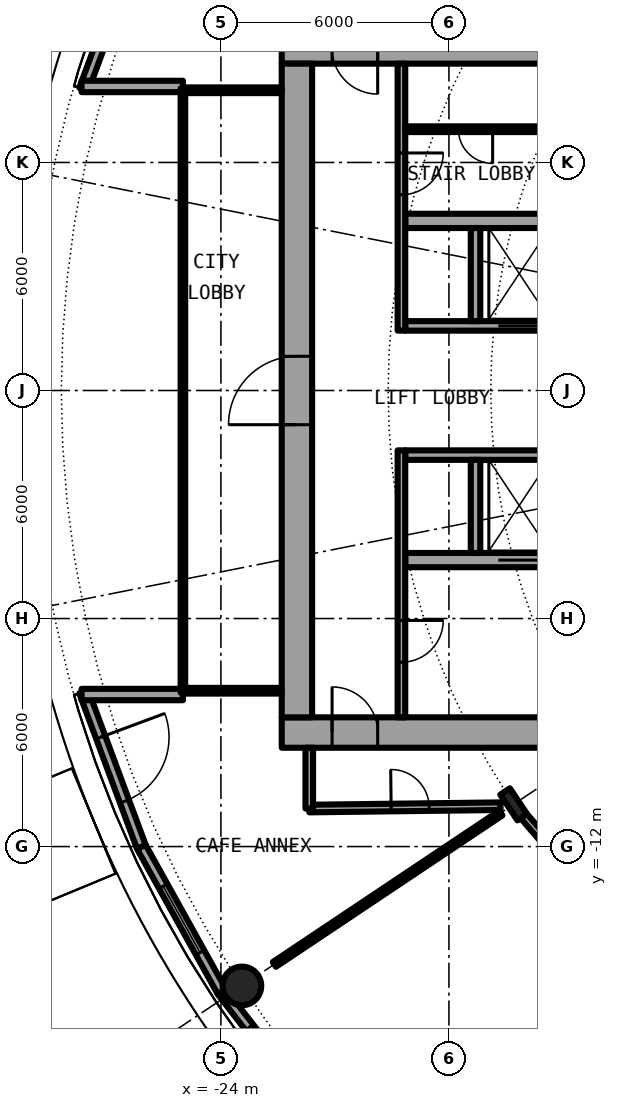
"""IFC4 building model, lengths in metres.
Left out: names, types, materials, properties, quantities, classifications, styles, units other than length and angle.
Written with IfcOpenShell. Run it as: python <this file> out.ifc"""

import sys

from ifc_helpers import new_model, si_unit, direction, frame, frame_2d, origin, origin_2d, place, context, subcontext, project, spatial, rectangle, hollow_circle, i_section, extrude, element, fill, save


model = new_model("IFC4")
c1 = context("Model", 3, precision=1e-05, world=origin(), true_north=direction((0.0, 1.0)))
c2 = subcontext(c1, "Body", "Model", "MODEL_VIEW")
j1 = project(units=[si_unit("LENGTHUNIT", "METRE"), si_unit("PLANEANGLEUNIT", "RADIAN")], contexts=[c1])
p1 = place(None, origin())
s1 = spatial("IfcSite", under=j1, at=p1, CompositionType="ELEMENT")
p2 = place(p1, origin())
s2 = spatial("IfcBuilding", under=s1, at=p2, CompositionType="ELEMENT")
p3 = place(p2, frame((0.0, 0.0, 9.6)))
s3 = spatial("IfcBuildingStorey", under=s2, at=p3, CompositionType="ELEMENT", Elevation=9.6)
p4 = place(p3, frame((-23.448, -15.667, 0.0), z_axis=(0.0, 0.0, 1.0), x_axis=(1.0, 0.0, 0.0)))
e1 = element("IfcColumn", 1, at=p4, inside=s3, PredefinedType="COLUMN", context=c2, shape_type="SweptSolid", body=[
    extrude(hollow_circle(Radius=0.508, WallThickness=0.05, at=origin_2d()), origin(), (0.0, 0.0, 1.0), 4.5),
])
p5 = place(p3, frame((-16.297, -10.889, 0.0), z_axis=(0.0, 0.0, 1.0), x_axis=(-0.831469612303, -0.55557023302, 0.0)))
e2 = element("IfcColumn", 2, at=p5, inside=s3, PredefinedType="COLUMN", context=c2, shape_type="SweptSolid", body=[
    extrude(i_section(OverallWidth=0.303, OverallDepth=0.814, WebThickness=0.021, FlangeThickness=0.04, FilletRadius=0.03, at=origin_2d()), origin(), (0.0, 0.0, 1.0), 4.5),
])
p6 = place(p3, frame((-26.093, 12.011, 0.0), z_axis=(0.0, 0.0, 1.0), x_axis=(-0.348003729264, -0.937493148998, 0.0)))
e3 = element("IfcWall", 3, at=p6, inside=s3, PredefinedType="SOLIDWALL", context=c2, shape_type="SweptSolid", body=[
    extrude(rectangle(XDim=4.359, YDim=0.25, at=frame_2d((2.18, 0.0))), origin(), (0.0, 0.0, 1.0), 4.05),
])
p7 = place(p6, frame((1.18, 0.0, 0.9)))
e4 = element("IfcOpeningElement", 4, at=p7, cuts=e3, PredefinedType="OPENING", context=c2, shape_type="SweptSolid", body=[
    extrude(rectangle(XDim=2.0, YDim=2.4, at=frame_2d((1.0, 1.2))), frame((0.0, 0.135, 0.0), z_axis=(0.0, -1.0, 0.0), x_axis=(1.0, 0.0, 0.0)), (0.0, 0.0, 1.0), 0.27),
])
p8 = place(p3, frame((-27.61, -7.924, 0.0), z_axis=(0.0, 0.0, 1.0), x_axis=(0.348003729264, -0.937493148998, 0.0)))
e5 = element("IfcWall", 5, at=p8, inside=s3, PredefinedType="SOLIDWALL", context=c2, shape_type="SweptSolid", body=[
    extrude(rectangle(XDim=4.359, YDim=0.25, at=frame_2d((2.18, 0.0))), origin(), (0.0, 0.0, 1.0), 4.05),
])
p9 = place(p8, frame((1.28, 0.0, 0.0)))
e6 = element("IfcOpeningElement", 6, at=p9, cuts=e5, PredefinedType="OPENING", context=c2, shape_type="SweptSolid", body=[
    extrude(rectangle(XDim=1.8, YDim=2.2, at=frame_2d((0.9, 1.1))), frame((0.0, 0.135, 0.0), z_axis=(0.0, -1.0, 0.0), x_axis=(1.0, 0.0, 0.0)), (0.0, 0.0, 1.0), 0.27),
])
p10 = place(p3, frame((-26.093, -12.011, 0.0), z_axis=(0.0, 0.0, 1.0), x_axis=(0.485761785263, -0.8740912355, 0.0)))
e7 = element("IfcWall", 7, at=p10, inside=s3, PredefinedType="SOLIDWALL", context=c2, shape_type="SweptSolid", body=[
    extrude(rectangle(XDim=4.36, YDim=0.25, at=frame_2d((2.18, 0.0))), origin(), (0.0, 0.0, 1.0), 4.05),
])
p11 = place(p10, frame((1.18, 0.0, 0.9)))
e8 = element("IfcOpeningElement", 8, at=p11, cuts=e7, PredefinedType="OPENING", context=c2, shape_type="SweptSolid", body=[
    extrude(rectangle(XDim=2.0, YDim=2.4, at=frame_2d((1.0, 1.2))), frame((0.0, 0.135, 0.0), z_axis=(0.0, -1.0, 0.0), x_axis=(1.0, 0.0, 0.0)), (0.0, 0.0, 1.0), 0.27),
])
p12 = place(p3, frame((-23.975, -15.822, 0.0), z_axis=(0.0, 0.0, 1.0), x_axis=(0.612637256412, -0.790364214812, 0.0)))
e9 = element("IfcWall", 9, at=p12, inside=s3, PredefinedType="SOLIDWALL", context=c2, shape_type="SweptSolid", body=[
    extrude(rectangle(XDim=4.36, YDim=0.25, at=frame_2d((2.18, 0.0))), origin(), (0.0, 0.0, 1.0), 4.05),
])
p13 = place(p12, frame((1.18, 0.0, 0.9)))
e10 = element("IfcOpeningElement", 10, at=p13, cuts=e9, PredefinedType="OPENING", context=c2, shape_type="SweptSolid", body=[
    extrude(rectangle(XDim=2.0, YDim=2.4, at=frame_2d((1.0, 1.2))), frame((0.0, 0.135, 0.0), z_axis=(0.0, -1.0, 0.0), x_axis=(1.0, 0.0, 0.0)), (0.0, 0.0, 1.0), 0.27),
])
for number, where, z_axis, x_axis in (
    (11, (-25.0, 8.0, 0.0), (0.0, 0.0, 1.0), (-1.0, 0.0, 0.0)),
    (12, (-25.0, -8.0, 0.0), (0.0, 0.0, 1.0), (-1.0, 0.0, 0.0)),
):
    element("IfcWall", number, at=place(p3, frame(where, z_axis=z_axis, x_axis=x_axis)), inside=s3, PredefinedType="SOLIDWALL", context=c2, shape_type="SweptSolid", body=[
        extrude(rectangle(XDim=2.667, YDim=0.3, at=frame_2d((1.333, 0.0))), origin(), (0.0, 0.0, 1.0), 4.05),
    ])
p14 = place(p3, frame((-22.4, -9.0, 0.0), z_axis=(0.0, 0.0, 1.0), x_axis=(1.0, 0.0, 0.0)))
e13 = element("IfcWall", 13, at=p14, inside=s3, PredefinedType="SHEAR", context=c2, shape_type="SweptSolid", body=[
    extrude(rectangle(XDim=14.2, YDim=0.8, at=frame_2d((7.1, 0.0))), origin(), (0.0, 0.0, 1.0), 4.5),
])
p15 = place(p14, frame((1.325, 0.0, 0.0)))
e14 = element("IfcOpeningElement", 14, at=p15, cuts=e13, PredefinedType="OPENING", context=c2, shape_type="SweptSolid", body=[
    extrude(rectangle(XDim=1.2, YDim=2.3, at=frame_2d((0.6, 1.15))), frame((0.0, 0.41, 0.0), z_axis=(0.0, -1.0, 0.0), x_axis=(1.0, 0.0, 0.0)), (0.0, 0.0, 1.0), 0.82),
])
p16 = place(p3, frame((-8.2, 9.0, 0.0), z_axis=(0.0, 0.0, 1.0), x_axis=(-1.0, 0.0, 0.0)))
e15 = element("IfcWall", 15, at=p16, inside=s3, PredefinedType="SHEAR", context=c2, shape_type="SweptSolid", body=[
    extrude(rectangle(XDim=14.2, YDim=0.8, at=frame_2d((7.1, 0.0))), origin(), (0.0, 0.0, 1.0), 4.5),
])
p17 = place(p16, frame((11.675, 0.0, 0.0)))
e16 = element("IfcOpeningElement", 16, at=p17, cuts=e15, PredefinedType="OPENING", context=c2, shape_type="SweptSolid", body=[
    extrude(rectangle(XDim=1.2, YDim=2.3, at=frame_2d((0.6, 1.15))), frame((0.0, 0.41, 0.0), z_axis=(0.0, -1.0, 0.0), x_axis=(1.0, 0.0, 0.0)), (0.0, 0.0, 1.0), 0.82),
])
p18 = place(p3, frame((-22.0, -8.6, 0.0), z_axis=(0.0, 0.0, 1.0), x_axis=(0.0, 1.0, 0.0)))
e17 = element("IfcWall", 17, at=p18, inside=s3, PredefinedType="SHEAR", context=c2, shape_type="SweptSolid", body=[
    extrude(rectangle(XDim=17.2, YDim=0.8, at=frame_2d((8.6, 0.0))), origin(), (0.0, 0.0, 1.0), 4.5),
])
p19 = place(p18, frame((7.7, 0.0, 0.0)))
e18 = element("IfcOpeningElement", 18, at=p19, cuts=e17, PredefinedType="OPENING", context=c2, shape_type="SweptSolid", body=[
    extrude(rectangle(XDim=1.8, YDim=2.3, at=frame_2d((0.9, 1.15))), frame((0.0, 0.41, 0.0), z_axis=(0.0, -1.0, 0.0), x_axis=(1.0, 0.0, 0.0)), (0.0, 0.0, 1.0), 0.82),
])
p20 = place(p3, frame((-9.0, -1.7, 0.0), z_axis=(0.0, 0.0, 1.0), x_axis=(-1.0, 0.0, 0.0)))
e19 = element("IfcWall", 19, at=p20, inside=s3, PredefinedType="SHEAR", context=c2, shape_type="SweptSolid", body=[
    extrude(rectangle(XDim=10.15, YDim=0.25, at=frame_2d((5.075, 0.0))), origin(), (0.0, 0.0, 1.0), 4.5),
])
p21 = place(p20, frame((0.387, 0.0, 0.0)))
e20 = element("IfcOpeningElement", 20, at=p21, cuts=e19, PredefinedType="OPENING", context=c2, shape_type="SweptSolid", body=[
    extrude(rectangle(XDim=1.1, YDim=2.3, at=frame_2d((0.55, 1.15))), frame((0.0, 0.135, 0.0), z_axis=(0.0, -1.0, 0.0), x_axis=(1.0, 0.0, 0.0)), (0.0, 0.0, 1.0), 0.27),
])
p22 = place(p20, frame((2.45, 0.0, 0.0)))
e21 = element("IfcOpeningElement", 21, at=p22, cuts=e19, PredefinedType="OPENING", context=c2, shape_type="SweptSolid", body=[
    extrude(rectangle(XDim=1.1, YDim=2.3, at=frame_2d((0.55, 1.15))), frame((0.0, 0.135, 0.0), z_axis=(0.0, -1.0, 0.0), x_axis=(1.0, 0.0, 0.0)), (0.0, 0.0, 1.0), 0.27),
])
p23 = place(p20, frame((4.45, 0.0, 0.0)))
e22 = element("IfcOpeningElement", 22, at=p23, cuts=e19, PredefinedType="OPENING", context=c2, shape_type="SweptSolid", body=[
    extrude(rectangle(XDim=1.1, YDim=2.3, at=frame_2d((0.55, 1.15))), frame((0.0, 0.135, 0.0), z_axis=(0.0, -1.0, 0.0), x_axis=(1.0, 0.0, 0.0)), (0.0, 0.0, 1.0), 0.27),
])
p24 = place(p3, frame((-9.0, -4.462, 0.0), z_axis=(0.0, 0.0, 1.0), x_axis=(-1.0, 0.0, 0.0)))
e23 = element("IfcWall", 23, at=p24, inside=s3, PredefinedType="SHEAR", context=c2, shape_type="SweptSolid", body=[
    extrude(rectangle(XDim=10.15, YDim=0.375, at=frame_2d((5.075, 0.0))), origin(), (0.0, 0.0, 1.0), 4.5),
])
p25 = place(p24, frame((6.6, 0.0, 0.0)))
e24 = element("IfcOpeningElement", 24, at=p25, cuts=e23, PredefinedType="OPENING", context=c2, shape_type="SweptSolid", body=[
    extrude(rectangle(XDim=1.1, YDim=2.3, at=frame_2d((0.55, 1.15))), frame((0.0, 0.198, 0.0), z_axis=(0.0, -1.0, 0.0), x_axis=(1.0, 0.0, 0.0)), (0.0, 0.0, 1.0), 0.395),
])
p26 = place(p3, frame((-17.3, -1.825, 0.0), z_axis=(0.0, 0.0, 1.0), x_axis=(0.0, -1.0, 0.0)))
e25 = element("IfcWall", 25, at=p26, inside=s3, PredefinedType="SOLIDWALL", context=c2, shape_type="SweptSolid", body=[
    extrude(rectangle(XDim=2.45, YDim=0.25, at=frame_2d((1.225, 0.0))), origin(), (0.0, 0.0, 1.0), 4.05),
])
p27 = place(p3, frame((-19.25, -1.575, 0.0), z_axis=(0.0, 0.0, 1.0), x_axis=(0.0, -1.0, 0.0)))
e26 = element("IfcWall", 26, at=p27, inside=s3, PredefinedType="SOLIDWALL", context=c2, shape_type="SweptSolid", body=[
    extrude(rectangle(XDim=7.025, YDim=0.2, at=frame_2d((3.513, 0.0))), origin(), (0.0, 0.0, 1.0), 4.05),
])
p28 = place(p27, frame((4.475, 0.0, 0.0)))
e27 = element("IfcOpeningElement", 27, at=p28, cuts=e26, PredefinedType="OPENING", context=c2, shape_type="SweptSolid", body=[
    extrude(rectangle(XDim=1.1, YDim=2.3, at=frame_2d((0.55, 1.15))), frame((0.0, 0.11, 0.0), z_axis=(0.0, -1.0, 0.0), x_axis=(1.0, 0.0, 0.0)), (0.0, 0.0, 1.0), 0.22),
])
p29 = place(p3, frame((-19.15, 1.7, 0.0), z_axis=(0.0, 0.0, 1.0), x_axis=(1.0, 0.0, 0.0)))
e28 = element("IfcWall", 28, at=p29, inside=s3, PredefinedType="SHEAR", context=c2, shape_type="SweptSolid", body=[
    extrude(rectangle(XDim=10.15, YDim=0.25, at=frame_2d((5.075, 0.0))), origin(), (0.0, 0.0, 1.0), 4.5),
])
p30 = place(p29, frame((2.45, 0.0, 0.0)))
e29 = element("IfcOpeningElement", 29, at=p30, cuts=e28, PredefinedType="OPENING", context=c2, shape_type="SweptSolid", body=[
    extrude(rectangle(XDim=1.1, YDim=2.3, at=frame_2d((0.55, 1.15))), frame((0.0, 0.135, 0.0), z_axis=(0.0, -1.0, 0.0), x_axis=(1.0, 0.0, 0.0)), (0.0, 0.0, 1.0), 0.27),
])
p31 = place(p29, frame((8.837, 0.0, 0.0)))
e30 = element("IfcOpeningElement", 30, at=p31, cuts=e28, PredefinedType="OPENING", context=c2, shape_type="SweptSolid", body=[
    extrude(rectangle(XDim=0.9, YDim=2.3, at=frame_2d((0.45, 1.15))), frame((0.0, 0.135, 0.0), z_axis=(0.0, -1.0, 0.0), x_axis=(1.0, 0.0, 0.0)), (0.0, 0.0, 1.0), 0.27),
])
p32 = place(p29, frame((6.8, 0.0, 0.0)))
e31 = element("IfcOpeningElement", 31, at=p32, cuts=e28, PredefinedType="OPENING", context=c2, shape_type="SweptSolid", body=[
    extrude(rectangle(XDim=0.9, YDim=2.3, at=frame_2d((0.45, 1.15))), frame((0.0, 0.135, 0.0), z_axis=(0.0, -1.0, 0.0), x_axis=(1.0, 0.0, 0.0)), (0.0, 0.0, 1.0), 0.27),
])
p33 = place(p29, frame((4.725, 0.0, 0.0)))
e32 = element("IfcOpeningElement", 32, at=p33, cuts=e28, PredefinedType="OPENING", context=c2, shape_type="SweptSolid", body=[
    extrude(rectangle(XDim=0.9, YDim=2.3, at=frame_2d((0.45, 1.15))), frame((0.0, 0.135, 0.0), z_axis=(0.0, -1.0, 0.0), x_axis=(1.0, 0.0, 0.0)), (0.0, 0.0, 1.0), 0.27),
])
p34 = place(p3, frame((-9.0, 4.462, 0.0), z_axis=(0.0, 0.0, 1.0), x_axis=(-1.0, 0.0, 0.0)))
e33 = element("IfcWall", 33, at=p34, inside=s3, PredefinedType="SHEAR", context=c2, shape_type="SweptSolid", body=[
    extrude(rectangle(XDim=10.15, YDim=0.375, at=frame_2d((5.075, 0.0))), origin(), (0.0, 0.0, 1.0), 4.5),
])
p35 = place(p3, frame((-17.3, 1.825, 0.0), z_axis=(0.0, 0.0, 1.0), x_axis=(0.0, 1.0, 0.0)))
e34 = element("IfcWall", 34, at=p35, inside=s3, PredefinedType="SOLIDWALL", context=c2, shape_type="SweptSolid", body=[
    extrude(rectangle(XDim=2.45, YDim=0.25, at=frame_2d((1.225, 0.0))), origin(), (0.0, 0.0, 1.0), 4.05),
])
p36 = place(p3, frame((-19.25, 8.6, 0.0), z_axis=(0.0, 0.0, 1.0), x_axis=(0.0, -1.0, 0.0)))
e35 = element("IfcWall", 35, at=p36, inside=s3, PredefinedType="SOLIDWALL", context=c2, shape_type="SweptSolid", body=[
    extrude(rectangle(XDim=7.025, YDim=0.2, at=frame_2d((3.513, 0.0))), origin(), (0.0, 0.0, 1.0), 4.05),
])
p37 = place(p36, frame((2.35, 0.0, 0.0)))
e36 = element("IfcOpeningElement", 36, at=p37, cuts=e35, PredefinedType="OPENING", context=c2, shape_type="SweptSolid", body=[
    extrude(rectangle(XDim=1.1, YDim=2.3, at=frame_2d((0.55, 1.15))), frame((0.0, 0.11, 0.0), z_axis=(0.0, -1.0, 0.0), x_axis=(1.0, 0.0, 0.0)), (0.0, 0.0, 1.0), 0.22),
])
p38 = place(p3, frame((-15.45, 6.875, 0.0), z_axis=(0.0, 0.0, 1.0), x_axis=(-1.0, 0.0, 0.0)))
e37 = element("IfcWall", 37, at=p38, inside=s3, PredefinedType="PARTITIONING", context=c2, shape_type="SweptSolid", body=[
    extrude(rectangle(XDim=3.7, YDim=0.15, at=frame_2d((1.85, 0.0))), origin(), (0.0, 0.0, 1.0), 4.05),
])
p39 = place(p38, frame((1.4, 0.0, 0.0)))
e38 = element("IfcOpeningElement", 38, at=p39, cuts=e37, PredefinedType="OPENING", context=c2, shape_type="SweptSolid", body=[
    extrude(rectangle(XDim=0.9, YDim=2.3, at=frame_2d((0.45, 1.15))), frame((0.0, 0.085, 0.0), z_axis=(0.0, -1.0, 0.0), x_axis=(1.0, 0.0, 0.0)), (0.0, 0.0, 1.0), 0.17),
])
for number, where, z_axis, x_axis in (
    (39, (-22.4, 7.9, 0.0), (0.0, 0.0, 1.0), (-1.0, 0.0, 0.0)),
    (40, (-22.4, -7.9, 0.0), (0.0, 0.0, 1.0), (-1.0, 0.0, 0.0)),
):
    element("IfcWall", number, at=place(p3, frame(where, z_axis=z_axis, x_axis=x_axis)), inside=s3, PredefinedType="PARTITIONING", context=c2, shape_type="SweptSolid", body=[
        extrude(rectangle(XDim=2.54, YDim=0.15, at=frame_2d((1.27, 0.0))), origin(), (0.0, 0.0, 1.0), 4.05),
    ])
p40 = place(p3, frame((-25.0, 7.95, 0.0), z_axis=(0.0, 0.0, 1.0), x_axis=(0.0, -1.0, 0.0)))
e41 = element("IfcWall", 41, at=p40, inside=s3, PredefinedType="PARTITIONING", context=c2, shape_type="SweptSolid", body=[
    extrude(rectangle(XDim=15.9, YDim=0.12, at=frame_2d((7.95, 0.0))), origin(), (0.0, 0.0, 1.0), 4.05),
])
p41 = place(p40, frame((0.95, 0.0, 0.1)))
e42 = element("IfcOpeningElement", 42, at=p41, cuts=e41, PredefinedType="OPENING", context=c2, shape_type="SweptSolid", body=[
    extrude(rectangle(XDim=14.0, YDim=3.7, at=frame_2d((7.0, 1.85))), frame((0.0, 0.07, 0.0), z_axis=(0.0, -1.0, 0.0), x_axis=(1.0, 0.0, 0.0)), (0.0, 0.0, 1.0), 0.14),
])
p42 = place(p3, frame((-16.197, -11.005, 0.0), z_axis=(0.0, 0.0, 1.0), x_axis=(0.653077876854, -0.757290754443, 0.0)))
e43 = element("IfcWall", 43, at=p42, inside=s3, PredefinedType="PARTITIONING", context=c2, shape_type="SweptSolid", body=[
    extrude(rectangle(XDim=4.646, YDim=0.2, at=frame_2d((2.323, 0.0))), origin(), (0.0, 0.0, 1.0), 3.63),
])
p43 = place(p3, frame((-21.675, -11.0, 0.0), z_axis=(0.0, 0.0, 1.0), x_axis=(0.999924074118, 0.012322580895, 0.0)))
e44 = element("IfcWall", 44, at=p43, inside=s3, PredefinedType="PARTITIONING", context=c2, shape_type="SweptSolid", body=[
    extrude(rectangle(XDim=5.032, YDim=0.2, at=frame_2d((2.516, 0.0))), origin(), (0.0, 0.0, 1.0), 4.05),
])
p44 = place(p43, frame((2.155, 0.0, 0.0)))
e45 = element("IfcOpeningElement", 45, at=p44, cuts=e44, PredefinedType="OPENING", context=c2, shape_type="SweptSolid", body=[
    extrude(rectangle(XDim=1.0, YDim=2.3, at=frame_2d((0.5, 1.15))), frame((0.0, 0.11, 0.0), z_axis=(0.0, -1.0, 0.0), x_axis=(1.0, 0.0, 0.0)), (0.0, 0.0, 1.0), 0.22),
])
p45 = place(p3, frame((-22.593, -15.101, 0.0), z_axis=(0.0, 0.0, 1.0), x_axis=(0.831415754305, 0.555650828752, 0.0)))
e46 = element("IfcWall", 46, at=p45, inside=s3, PredefinedType="PARTITIONING", context=c2, shape_type="SweptSolid", body=[
    extrude(rectangle(XDim=7.168, YDim=0.15, at=frame_2d((3.584, 0.0))), origin(), (0.0, 0.0, 1.0), 4.05),
])
p46 = place(p3, frame((-21.675, -11.0, 0.0), z_axis=(0.0, 0.0, 1.0), x_axis=(0.0, 1.0, 0.0)))
e47 = element("IfcWall", 47, at=p46, inside=s3, PredefinedType="PARTITIONING", context=c2, shape_type="SweptSolid", body=[
    extrude(rectangle(XDim=1.6, YDim=0.2, at=frame_2d((0.8, 0.0))), origin(), (0.0, 0.0, 1.0), 4.05),
])
p47 = place(p9, origin())
e48 = element("IfcDoor", 48, at=p47, inside=s3, OperationType="SINGLE_SWING_LEFT", PredefinedType="DOOR", context=c2, shape_type="SweptSolid", body=[
    extrude(rectangle(XDim=1.8, YDim=2.2, at=frame_2d((0.9, 1.1))), frame((0.0, 0.025, 0.0), z_axis=(0.0, -1.0, 0.0), x_axis=(1.0, 0.0, 0.0)), (0.0, 0.0, 1.0), 0.05),
])
fill(e6, e48)
p48 = place(p11, origin())
e49 = element("IfcWindow", 49, at=p48, inside=s3, PartitioningType="SINGLE_PANEL", PredefinedType="WINDOW", context=c2, shape_type="SweptSolid", body=[
    extrude(rectangle(XDim=2.0, YDim=2.4, at=frame_2d((1.0, 1.2))), frame((0.0, 0.03, 0.0), z_axis=(0.0, -1.0, 0.0), x_axis=(1.0, 0.0, 0.0)), (0.0, 0.0, 1.0), 0.06),
])
fill(e8, e49)
p49 = place(p13, origin())
e50 = element("IfcWindow", 50, at=p49, inside=s3, PartitioningType="SINGLE_PANEL", PredefinedType="WINDOW", context=c2, shape_type="SweptSolid", body=[
    extrude(rectangle(XDim=2.0, YDim=2.4, at=frame_2d((1.0, 1.2))), frame((0.0, 0.03, 0.0), z_axis=(0.0, -1.0, 0.0), x_axis=(1.0, 0.0, 0.0)), (0.0, 0.0, 1.0), 0.06),
])
fill(e10, e50)
p50 = place(p25, origin())
e51 = element("IfcDoor", 51, at=p50, inside=s3, OperationType="DOUBLE_DOOR_SLIDING", PredefinedType="DOOR", context=c2, shape_type="SweptSolid", body=[
    extrude(rectangle(XDim=1.1, YDim=2.3, at=frame_2d((0.55, 1.15))), frame((0.0, 0.025, 0.0), z_axis=(0.0, -1.0, 0.0), x_axis=(1.0, 0.0, 0.0)), (0.0, 0.0, 1.0), 0.05),
])
fill(e24, e51)
p51 = place(p30, origin())
e52 = element("IfcDoor", 52, at=p51, inside=s3, OperationType="DOUBLE_DOOR_SLIDING", PredefinedType="DOOR", context=c2, shape_type="SweptSolid", body=[
    extrude(rectangle(XDim=1.1, YDim=2.3, at=frame_2d((0.55, 1.15))), frame((0.0, 0.025, 0.0), z_axis=(0.0, -1.0, 0.0), x_axis=(1.0, 0.0, 0.0)), (0.0, 0.0, 1.0), 0.05),
])
fill(e29, e52)
p52 = place(p39, origin())
e53 = element("IfcDoor", 53, at=p52, inside=s3, OperationType="SINGLE_SWING_LEFT", PredefinedType="DOOR", context=c2, shape_type="SweptSolid", body=[
    extrude(rectangle(XDim=0.9, YDim=2.3, at=frame_2d((0.45, 1.15))), frame((0.0, 0.025, 0.0), z_axis=(0.0, -1.0, 0.0), x_axis=(1.0, 0.0, 0.0)), (0.0, 0.0, 1.0), 0.05),
])
fill(e38, e53)
p53 = place(p28, origin())
e54 = element("IfcDoor", 54, at=p53, inside=s3, OperationType="SINGLE_SWING_LEFT", PredefinedType="DOOR", context=c2, shape_type="SweptSolid", body=[
    extrude(rectangle(XDim=1.1, YDim=2.3, at=frame_2d((0.55, 1.15))), frame((0.0, 0.025, 0.0), z_axis=(0.0, -1.0, 0.0), x_axis=(1.0, 0.0, 0.0)), (0.0, 0.0, 1.0), 0.05),
])
fill(e27, e54)
p54 = place(p37, origin())
e55 = element("IfcDoor", 55, at=p54, inside=s3, OperationType="SINGLE_SWING_RIGHT", PredefinedType="DOOR", context=c2, shape_type="SweptSolid", body=[
    extrude(rectangle(XDim=1.1, YDim=2.3, at=frame_2d((0.55, 1.15))), frame((0.0, 0.025, 0.0), z_axis=(0.0, -1.0, 0.0), x_axis=(1.0, 0.0, 0.0)), (0.0, 0.0, 1.0), 0.05),
])
fill(e36, e55)
p55 = place(p15, origin())
e56 = element("IfcDoor", 56, at=p55, inside=s3, OperationType="SINGLE_SWING_RIGHT", PredefinedType="DOOR", context=c2, shape_type="SweptSolid", body=[
    extrude(rectangle(XDim=1.2, YDim=2.3, at=frame_2d((0.6, 1.15))), frame((0.0, 0.025, 0.0), z_axis=(0.0, -1.0, 0.0), x_axis=(1.0, 0.0, 0.0)), (0.0, 0.0, 1.0), 0.05),
])
fill(e14, e56)
p56 = place(p19, origin())
e57 = element("IfcDoor", 57, at=p56, inside=s3, OperationType="SINGLE_SWING_LEFT", PredefinedType="DOOR", context=c2, shape_type="SweptSolid", body=[
    extrude(rectangle(XDim=1.8, YDim=2.3, at=frame_2d((0.9, 1.15))), frame((0.0, 0.025, 0.0), z_axis=(0.0, -1.0, 0.0), x_axis=(1.0, 0.0, 0.0)), (0.0, 0.0, 1.0), 0.05),
])
fill(e18, e57)
p57 = place(p41, origin())
e58 = element("IfcWindow", 58, at=p57, inside=s3, PartitioningType="SINGLE_PANEL", PredefinedType="WINDOW", context=c2, shape_type="SweptSolid", body=[
    extrude(rectangle(XDim=14.0, YDim=3.7, at=frame_2d((7.0, 1.85))), frame((0.0, 0.03, 0.0), z_axis=(0.0, -1.0, 0.0), x_axis=(1.0, 0.0, 0.0)), (0.0, 0.0, 1.0), 0.06),
])
fill(e42, e58)
p58 = place(p44, origin())
e59 = element("IfcDoor", 59, at=p58, inside=s3, OperationType="SINGLE_SWING_RIGHT", PredefinedType="DOOR", context=c2, shape_type="SweptSolid", body=[
    extrude(rectangle(XDim=1.0, YDim=2.3, at=frame_2d((0.5, 1.15))), frame((0.0, 0.025, 0.0), z_axis=(0.0, -1.0, 0.0), x_axis=(1.0, 0.0, 0.0)), (0.0, 0.0, 1.0), 0.05),
])
fill(e45, e59)
save(model, sys.argv[1])
